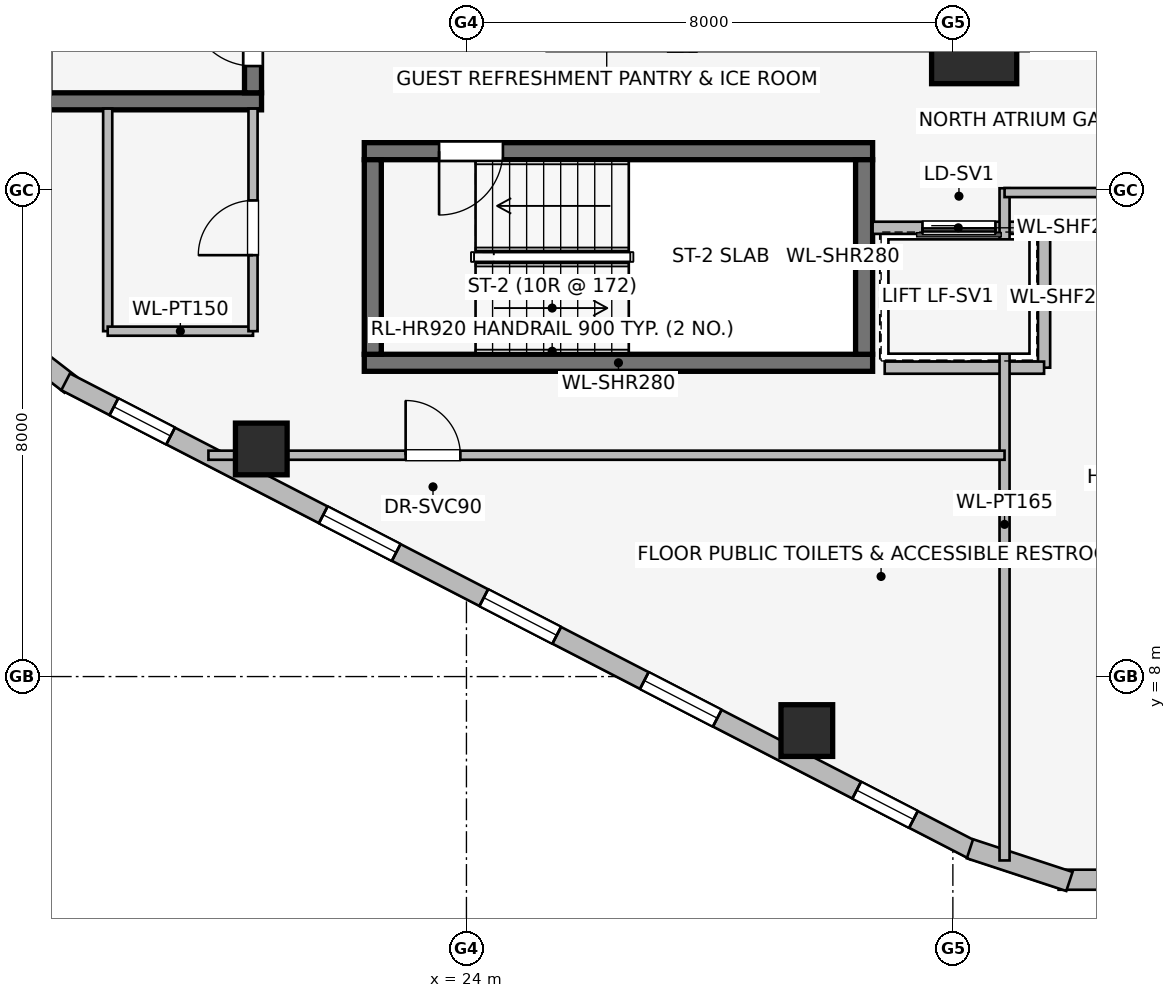
"""IFC4 building model, lengths in metres.
Left out: names, types, materials, properties, quantities, classifications, styles, units other than length and angle.
Written with IfcOpenShell. Run it as: python <this file> out.ifc"""

import sys

from ifc_helpers import new_model, si_unit, direction, frame, frame_2d, origin, origin_2d, place, context, subcontext, project, spatial, rectangle, extrude, element, fill, save


model = new_model("IFC4")
c1 = context("Model", 3, precision=1e-05, world=origin(), true_north=direction((0.0, 1.0)))
c2 = subcontext(c1, "Body", "Model", "MODEL_VIEW")
j1 = project(units=[si_unit("LENGTHUNIT", "METRE"), si_unit("PLANEANGLEUNIT", "RADIAN")], contexts=[c1])
p1 = place(None, origin())
s1 = spatial("IfcSite", under=j1, at=p1, CompositionType="ELEMENT")
p2 = place(p1, origin())
s2 = spatial("IfcBuilding", under=s1, at=p2, CompositionType="ELEMENT")
p3 = place(p2, frame((0.0, 0.0, 163.65)))
s3 = spatial("IfcBuildingStorey", under=s2, at=p3, CompositionType="ELEMENT", Elevation=163.65)
p4 = place(p3, frame((16.87, 17.46, 0.0), z_axis=(0.0, 0.0, 1.0), x_axis=(1.0, 0.0, 0.0)))
e1 = element("IfcWall", 1, at=p4, inside=s3, PredefinedType="SHEAR", context=c2, shape_type="SweptSolid", body=[
    extrude(rectangle(XDim=3.76, YDim=0.28, at=frame_2d((1.88, 0.0))), origin(), (0.0, 0.0, 1.0), 3.45),
])
p5 = place(p3, frame((20.49, 17.6, 0.0), z_axis=(0.0, 0.0, 1.0), x_axis=(0.0, 1.0, 0.0)))
e2 = element("IfcWall", 2, at=p5, inside=s3, PredefinedType="SHEAR", context=c2, shape_type="SweptSolid", body=[
    extrude(rectangle(XDim=7.8, YDim=0.28, at=frame_2d((3.9, 0.0))), origin(), (0.0, 0.0, 1.0), 3.45),
])
p6 = place(p5, frame((0.44, 0.0, 0.0)))
e3 = element("IfcOpeningElement", 3, at=p6, cuts=e2, PredefinedType="OPENING", context=c2, shape_type="SweptSolid", body=[
    extrude(rectangle(XDim=1.05, YDim=2.0, at=frame_2d((0.525, 1.0))), frame((0.0, 0.15, 0.0), z_axis=(0.0, -1.0, 0.0), x_axis=(1.0, 0.0, 0.0)), (0.0, 0.0, 1.0), 0.3),
])
p7 = place(p3, frame((22.32, 13.16, 0.0), z_axis=(0.0, 0.0, 1.0), x_axis=(1.0, 0.0, 0.0)))
e4 = element("IfcWall", 4, at=p7, inside=s3, PredefinedType="SHEAR", context=c2, shape_type="SweptSolid", body=[
    extrude(rectangle(XDim=8.36, YDim=0.28, at=frame_2d((4.18, 0.0))), origin(), (0.0, 0.0, 1.0), 3.45),
])
p8 = place(p3, frame((30.68, 16.64, 0.0), z_axis=(0.0, 0.0, 1.0), x_axis=(-1.0, 0.0, 0.0)))
e5 = element("IfcWall", 5, at=p8, inside=s3, PredefinedType="SHEAR", context=c2, shape_type="SweptSolid", body=[
    extrude(rectangle(XDim=8.36, YDim=0.28, at=frame_2d((4.18, 0.0))), origin(), (0.0, 0.0, 1.0), 3.45),
])
p9 = place(p8, frame((6.08, 0.0, 0.0)))
e6 = element("IfcOpeningElement", 6, at=p9, cuts=e5, PredefinedType="OPENING", context=c2, shape_type="SweptSolid", body=[
    extrude(rectangle(XDim=1.05, YDim=2.0, at=frame_2d((0.525, 1.0))), frame((0.0, 0.15, 0.0), z_axis=(0.0, -1.0, 0.0), x_axis=(1.0, 0.0, 0.0)), (0.0, 0.0, 1.0), 0.3),
])
for number, where, z_axis, x_axis in (
    (7, (22.46, 16.5, 0.0), (0.0, 0.0, 1.0), (0.0, -1.0, 0.0)),
    (8, (30.54, 13.3, 0.0), (0.0, 0.0, 1.0), (0.0, 1.0, 0.0)),
):
    element("IfcWall", number, at=place(p3, frame(where, z_axis=z_axis, x_axis=x_axis)), inside=s3, PredefinedType="SHEAR", context=c2, shape_type="SweptSolid", body=[
        extrude(rectangle(XDim=3.2, YDim=0.28, at=frame_2d((1.6, 0.0))), origin(), (0.0, 0.0, 1.0), 3.45),
    ])
p10 = place(p3, frame((32.35, 18.45, 0.0), z_axis=(0.0, 0.0, 1.0), x_axis=(1.0, 0.0, 0.0)))
e9 = element("IfcColumn", 9, at=p10, inside=s3, PredefinedType="COLUMN", context=c2, shape_type="SweptSolid", body=[
    extrude(rectangle(XDim=1.4, YDim=1.4, at=origin_2d()), origin(), (0.0, 0.0, 1.0), 3.45),
])
for number, where, z_axis, x_axis in (
    (10, (20.626, 11.743, 0.0), (0.0, 0.0, 1.0), (1.0, 0.0, 0.0)),
    (11, (29.598, 7.112, 0.0), (0.0, 0.0, 1.0), (1.0, 0.0, 0.0)),
):
    element("IfcColumn", number, at=place(p3, frame(where, z_axis=z_axis, x_axis=x_axis)), inside=s3, PredefinedType="COLUMN", context=c2, shape_type="SweptSolid", body=[
        extrude(rectangle(XDim=0.85, YDim=0.85, at=origin_2d()), origin(), (0.0, 0.0, 1.0), 3.45),
    ])
p11 = place(p3, frame((17.489, 12.8, 0.0), z_axis=(0.0, 0.0, 1.0), x_axis=(-0.791409877269, 0.611285862884, 0.0)))
e12 = element("IfcWall", 12, at=p11, inside=s3, PredefinedType="STANDARD", context=c2, shape_type="SweptSolid", body=[
    extrude(rectangle(XDim=1.677, YDim=0.33, at=frame_2d((0.838, 0.0))), origin(), (0.0, 0.0, 1.0), 3.19),
])
p12 = place(p3, frame((32.362, 5.129, 0.0), z_axis=(0.0, 0.0, 1.0), x_axis=(-0.888626188278, 0.458632202867, 0.0)))
e13 = element("IfcWall", 13, at=p12, inside=s3, PredefinedType="STANDARD", context=c2, shape_type="SweptSolid", body=[
    extrude(rectangle(XDim=16.828, YDim=0.31, at=frame_2d((8.414, 0.0))), origin(), (0.0, 0.0, 1.0), 3.19),
])
p13 = place(p12, frame((1.137, 0.0, 0.75)))
e14 = element("IfcOpeningElement", 14, at=p13, cuts=e13, PredefinedType="OPENING", context=c2, shape_type="SweptSolid", body=[
    extrude(rectangle(XDim=1.05, YDim=1.4, at=frame_2d((0.525, 0.7))), frame((0.0, 0.165, 0.0), z_axis=(0.0, -1.0, 0.0), x_axis=(1.0, 0.0, 0.0)), (0.0, 0.0, 1.0), 0.33),
])
p14 = place(p12, frame((4.768, 0.0, 0.75)))
e15 = element("IfcOpeningElement", 15, at=p14, cuts=e13, PredefinedType="OPENING", context=c2, shape_type="SweptSolid", body=[
    extrude(rectangle(XDim=1.35, YDim=1.45, at=frame_2d((0.675, 0.725))), frame((0.0, 0.165, 0.0), z_axis=(0.0, -1.0, 0.0), x_axis=(1.0, 0.0, 0.0)), (0.0, 0.0, 1.0), 0.33),
])
p15 = place(p12, frame((7.739, 0.0, 0.75)))
e16 = element("IfcOpeningElement", 16, at=p15, cuts=e13, PredefinedType="OPENING", context=c2, shape_type="SweptSolid", body=[
    extrude(rectangle(XDim=1.35, YDim=1.45, at=frame_2d((0.675, 0.725))), frame((0.0, 0.165, 0.0), z_axis=(0.0, -1.0, 0.0), x_axis=(1.0, 0.0, 0.0)), (0.0, 0.0, 1.0), 0.33),
])
p16 = place(p12, frame((10.71, 0.0, 0.75)))
e17 = element("IfcOpeningElement", 17, at=p16, cuts=e13, PredefinedType="OPENING", context=c2, shape_type="SweptSolid", body=[
    extrude(rectangle(XDim=1.35, YDim=1.45, at=frame_2d((0.675, 0.725))), frame((0.0, 0.165, 0.0), z_axis=(0.0, -1.0, 0.0), x_axis=(1.0, 0.0, 0.0)), (0.0, 0.0, 1.0), 0.33),
])
p17 = place(p12, frame((14.885, 0.0, 0.75)))
e18 = element("IfcOpeningElement", 18, at=p17, cuts=e13, PredefinedType="OPENING", context=c2, shape_type="SweptSolid", body=[
    extrude(rectangle(XDim=1.05, YDim=1.4, at=frame_2d((0.525, 0.7))), frame((0.0, 0.165, 0.0), z_axis=(0.0, -1.0, 0.0), x_axis=(1.0, 0.0, 0.0)), (0.0, 0.0, 1.0), 0.33),
])
p18 = place(p3, frame((35.461, 4.659, 0.0), z_axis=(0.0, 0.0, 1.0), x_axis=(-1.0, 0.0, 0.0)))
e19 = element("IfcWall", 19, at=p18, inside=s3, PredefinedType="STANDARD", context=c2, shape_type="SweptSolid", body=[
    extrude(rectangle(XDim=1.722, YDim=0.33, at=frame_2d((0.861, 0.0))), origin(), (0.0, 0.0, 1.0), 3.19),
])
p19 = place(p3, frame((33.917, 4.63, 0.0), z_axis=(0.0, 0.0, 1.0), x_axis=(-0.949937416267, 0.312440242569, 0.0)))
e20 = element("IfcWall", 20, at=p19, inside=s3, PredefinedType="STANDARD", context=c2, shape_type="SweptSolid", body=[
    extrude(rectangle(XDim=1.722, YDim=0.33, at=frame_2d((0.861, 0.0))), origin(), (0.0, 0.0, 1.0), 3.19),
])
p20 = place(p3, frame((33.5, 15.38, 0.0), z_axis=(0.0, 0.0, 1.0), x_axis=(-1.0, 0.0, 0.0)))
e21 = element("IfcWall", 21, at=p20, inside=s3, PredefinedType="PARTITIONING", context=c2, shape_type="SweptSolid", body=[
    extrude(rectangle(XDim=2.82, YDim=0.2, at=frame_2d((1.41, 0.0))), origin(), (0.0, 0.0, 1.0), 3.19),
])
p21 = place(p20, frame((0.8, 0.0, 0.0)))
e22 = element("IfcOpeningElement", 22, at=p21, cuts=e21, PredefinedType="OPENING", context=c2, shape_type="SweptSolid", body=[
    extrude(rectangle(XDim=1.2, YDim=2.2, at=frame_2d((0.6, 1.1))), frame((0.0, 0.11, 0.0), z_axis=(0.0, -1.0, 0.0), x_axis=(1.0, 0.0, 0.0)), (0.0, 0.0, 1.0), 0.22),
])
p22 = place(p3, frame((33.5, 13.08, 0.0), z_axis=(0.0, 0.0, 1.0), x_axis=(0.0, 1.0, 0.0)))
e23 = element("IfcWall", 23, at=p22, inside=s3, PredefinedType="PARTITIONING", context=c2, shape_type="SweptSolid", body=[
    extrude(rectangle(XDim=2.3, YDim=0.2, at=frame_2d((1.15, 0.0))), origin(), (0.0, 0.0, 1.0), 3.19),
])
p23 = place(p3, frame((30.879, 13.08, 0.0), z_axis=(0.0, 0.0, 1.0), x_axis=(1.0, 0.0, 0.0)))
e24 = element("IfcWall", 24, at=p23, inside=s3, PredefinedType="PARTITIONING", context=c2, shape_type="SweptSolid", body=[
    extrude(rectangle(XDim=2.621, YDim=0.2, at=frame_2d((1.311, 0.0))), origin(), (0.0, 0.0, 1.0), 3.19),
])
p24 = place(p3, frame((18.1, 17.34, 0.0), z_axis=(0.0, 0.0, 1.0), x_axis=(0.0, -1.0, 0.0)))
e25 = element("IfcWall", 25, at=p24, inside=s3, PredefinedType="PARTITIONING", context=c2, shape_type="SweptSolid", body=[
    extrude(rectangle(XDim=3.66, YDim=0.15, at=frame_2d((1.83, 0.0))), origin(), (0.0, 0.0, 1.0), 3.19),
])
p25 = place(p3, frame((18.1, 13.68, 0.0), z_axis=(0.0, 0.0, 1.0), x_axis=(1.0, 0.0, 0.0)))
e26 = element("IfcWall", 26, at=p25, inside=s3, PredefinedType="PARTITIONING", context=c2, shape_type="SweptSolid", body=[
    extrude(rectangle(XDim=2.39, YDim=0.15, at=frame_2d((1.195, 0.0))), origin(), (0.0, 0.0, 1.0), 3.19),
])
p26 = place(p3, frame((20.49, 13.68, 0.0), z_axis=(0.0, 0.0, 1.0), x_axis=(0.0, 1.0, 0.0)))
e27 = element("IfcWall", 27, at=p26, inside=s3, PredefinedType="PARTITIONING", context=c2, shape_type="SweptSolid", body=[
    extrude(rectangle(XDim=3.66, YDim=0.15, at=frame_2d((1.83, 0.0))), origin(), (0.0, 0.0, 1.0), 3.19),
])
p27 = place(p26, frame((1.25, 0.0, 0.0)))
e28 = element("IfcOpeningElement", 28, at=p27, cuts=e27, PredefinedType="OPENING", context=c2, shape_type="SweptSolid", body=[
    extrude(rectangle(XDim=0.9, YDim=2.0, at=frame_2d((0.45, 1.0))), frame((0.0, 0.085, 0.0), z_axis=(0.0, -1.0, 0.0), x_axis=(1.0, 0.0, 0.0)), (0.0, 0.0, 1.0), 0.17),
])
p28 = place(p3, frame((32.85, 4.976, 0.0), z_axis=(0.0, 0.0, 1.0), x_axis=(0.0, 1.0, 0.0)))
e29 = element("IfcWall", 29, at=p28, inside=s3, PredefinedType="PARTITIONING", context=c2, shape_type="SweptSolid", body=[
    extrude(rectangle(XDim=11.054, YDim=0.165, at=frame_2d((5.527, 0.0))), origin(), (0.0, 0.0, 1.0), 3.19),
])
p29 = place(p3, frame((19.757, 11.64, 0.0), z_axis=(0.0, 0.0, 1.0), x_axis=(1.0, 0.0, 0.0)))
e30 = element("IfcWall", 30, at=p29, inside=s3, PredefinedType="PARTITIONING", context=c2, shape_type="SweptSolid", body=[
    extrude(rectangle(XDim=13.093, YDim=0.15, at=frame_2d((6.546, 0.0))), origin(), (0.0, 0.0, 1.0), 3.19),
])
p30 = place(p29, frame((3.243, 0.0, 0.0)))
e31 = element("IfcOpeningElement", 31, at=p30, cuts=e30, PredefinedType="OPENING", context=c2, shape_type="SweptSolid", body=[
    extrude(rectangle(XDim=0.9, YDim=2.0, at=frame_2d((0.45, 1.0))), frame((0.0, 0.085, 0.0), z_axis=(0.0, -1.0, 0.0), x_axis=(1.0, 0.0, 0.0)), (0.0, 0.0, 1.0), 0.17),
])
p31 = place(p3, frame((32.85, 15.96, 0.0), z_axis=(0.0, 0.0, 1.0), x_axis=(1.0, 0.0, 0.0)))
e32 = element("IfcWall", 32, at=p31, inside=s3, PredefinedType="PARTITIONING", context=c2, shape_type="SweptSolid", body=[
    extrude(rectangle(XDim=10.533, YDim=0.15, at=frame_2d((5.267, 0.0))), origin(), (0.0, 0.0, 1.0), 3.19),
])
p32 = place(p31, frame((4.787, 0.0, 0.0)))
e33 = element("IfcOpeningElement", 33, at=p32, cuts=e32, PredefinedType="OPENING", context=c2, shape_type="SweptSolid", body=[
    extrude(rectangle(XDim=0.96, YDim=2.0, at=frame_2d((0.48, 1.0))), frame((0.0, 0.085, 0.0), z_axis=(0.0, -1.0, 0.0), x_axis=(1.0, 0.0, 0.0)), (0.0, 0.0, 1.0), 0.17),
])
p33 = place(p13, origin())
e34 = element("IfcWindow", 34, at=p33, inside=s3, PartitioningType="SINGLE_PANEL", PredefinedType="WINDOW", context=c2, shape_type="SweptSolid", body=[
    extrude(rectangle(XDim=1.05, YDim=1.4, at=frame_2d((0.525, 0.7))), frame((0.0, 0.03, 0.0), z_axis=(0.0, -1.0, 0.0), x_axis=(1.0, 0.0, 0.0)), (0.0, 0.0, 1.0), 0.06),
])
fill(e14, e34)
p34 = place(p14, origin())
e35 = element("IfcWindow", 35, at=p34, inside=s3, PartitioningType="SINGLE_PANEL", PredefinedType="WINDOW", context=c2, shape_type="SweptSolid", body=[
    extrude(rectangle(XDim=1.35, YDim=1.45, at=frame_2d((0.675, 0.725))), frame((0.0, 0.03, 0.0), z_axis=(0.0, -1.0, 0.0), x_axis=(1.0, 0.0, 0.0)), (0.0, 0.0, 1.0), 0.06),
])
fill(e15, e35)
p35 = place(p15, origin())
e36 = element("IfcWindow", 36, at=p35, inside=s3, PartitioningType="SINGLE_PANEL", PredefinedType="WINDOW", context=c2, shape_type="SweptSolid", body=[
    extrude(rectangle(XDim=1.35, YDim=1.45, at=frame_2d((0.675, 0.725))), frame((0.0, 0.03, 0.0), z_axis=(0.0, -1.0, 0.0), x_axis=(1.0, 0.0, 0.0)), (0.0, 0.0, 1.0), 0.06),
])
fill(e16, e36)
p36 = place(p16, origin())
e37 = element("IfcWindow", 37, at=p36, inside=s3, PartitioningType="SINGLE_PANEL", PredefinedType="WINDOW", context=c2, shape_type="SweptSolid", body=[
    extrude(rectangle(XDim=1.35, YDim=1.45, at=frame_2d((0.675, 0.725))), frame((0.0, 0.03, 0.0), z_axis=(0.0, -1.0, 0.0), x_axis=(1.0, 0.0, 0.0)), (0.0, 0.0, 1.0), 0.06),
])
fill(e17, e37)
p37 = place(p17, origin())
e38 = element("IfcWindow", 38, at=p37, inside=s3, PartitioningType="SINGLE_PANEL", PredefinedType="WINDOW", context=c2, shape_type="SweptSolid", body=[
    extrude(rectangle(XDim=1.05, YDim=1.4, at=frame_2d((0.525, 0.7))), frame((0.0, 0.03, 0.0), z_axis=(0.0, -1.0, 0.0), x_axis=(1.0, 0.0, 0.0)), (0.0, 0.0, 1.0), 0.06),
])
fill(e18, e38)
p38 = place(p6, origin())
e39 = element("IfcDoor", 39, at=p38, inside=s3, OperationType="SINGLE_SWING_RIGHT", PredefinedType="DOOR", context=c2, shape_type="SweptSolid", body=[
    extrude(rectangle(XDim=1.05, YDim=2.0, at=frame_2d((0.525, 1.0))), frame((0.0, 0.025, 0.0), z_axis=(0.0, -1.0, 0.0), x_axis=(1.0, 0.0, 0.0)), (0.0, 0.0, 1.0), 0.05),
])
fill(e3, e39)
p39 = place(p9, origin())
e40 = element("IfcDoor", 40, at=p39, inside=s3, OperationType="SINGLE_SWING_RIGHT", PredefinedType="DOOR", context=c2, shape_type="SweptSolid", body=[
    extrude(rectangle(XDim=1.05, YDim=2.0, at=frame_2d((0.525, 1.0))), frame((0.0, 0.025, 0.0), z_axis=(0.0, -1.0, 0.0), x_axis=(1.0, 0.0, 0.0)), (0.0, 0.0, 1.0), 0.05),
])
fill(e6, e40)
p40 = place(p21, origin())
e41 = element("IfcDoor", 41, at=p40, inside=s3, OperationType="SLIDING_TO_RIGHT", PredefinedType="DOOR", context=c2, shape_type="SweptSolid", body=[
    extrude(rectangle(XDim=1.2, YDim=2.2, at=frame_2d((0.6, 1.1))), frame((0.0, 0.025, 0.0), z_axis=(0.0, -1.0, 0.0), x_axis=(1.0, 0.0, 0.0)), (0.0, 0.0, 1.0), 0.05),
])
fill(e22, e41)
p41 = place(p27, origin())
e42 = element("IfcDoor", 42, at=p41, inside=s3, OperationType="SINGLE_SWING_LEFT", PredefinedType="DOOR", context=c2, shape_type="SweptSolid", body=[
    extrude(rectangle(XDim=0.9, YDim=2.0, at=frame_2d((0.45, 1.0))), frame((0.0, 0.025, 0.0), z_axis=(0.0, -1.0, 0.0), x_axis=(1.0, 0.0, 0.0)), (0.0, 0.0, 1.0), 0.05),
])
fill(e28, e42)
p42 = place(p30, origin())
e43 = element("IfcDoor", 43, at=p42, inside=s3, OperationType="SINGLE_SWING_LEFT", PredefinedType="DOOR", context=c2, shape_type="SweptSolid", body=[
    extrude(rectangle(XDim=0.9, YDim=2.0, at=frame_2d((0.45, 1.0))), frame((0.0, 0.025, 0.0), z_axis=(0.0, -1.0, 0.0), x_axis=(1.0, 0.0, 0.0)), (0.0, 0.0, 1.0), 0.05),
])
fill(e31, e43)
save(model, sys.argv[1])
